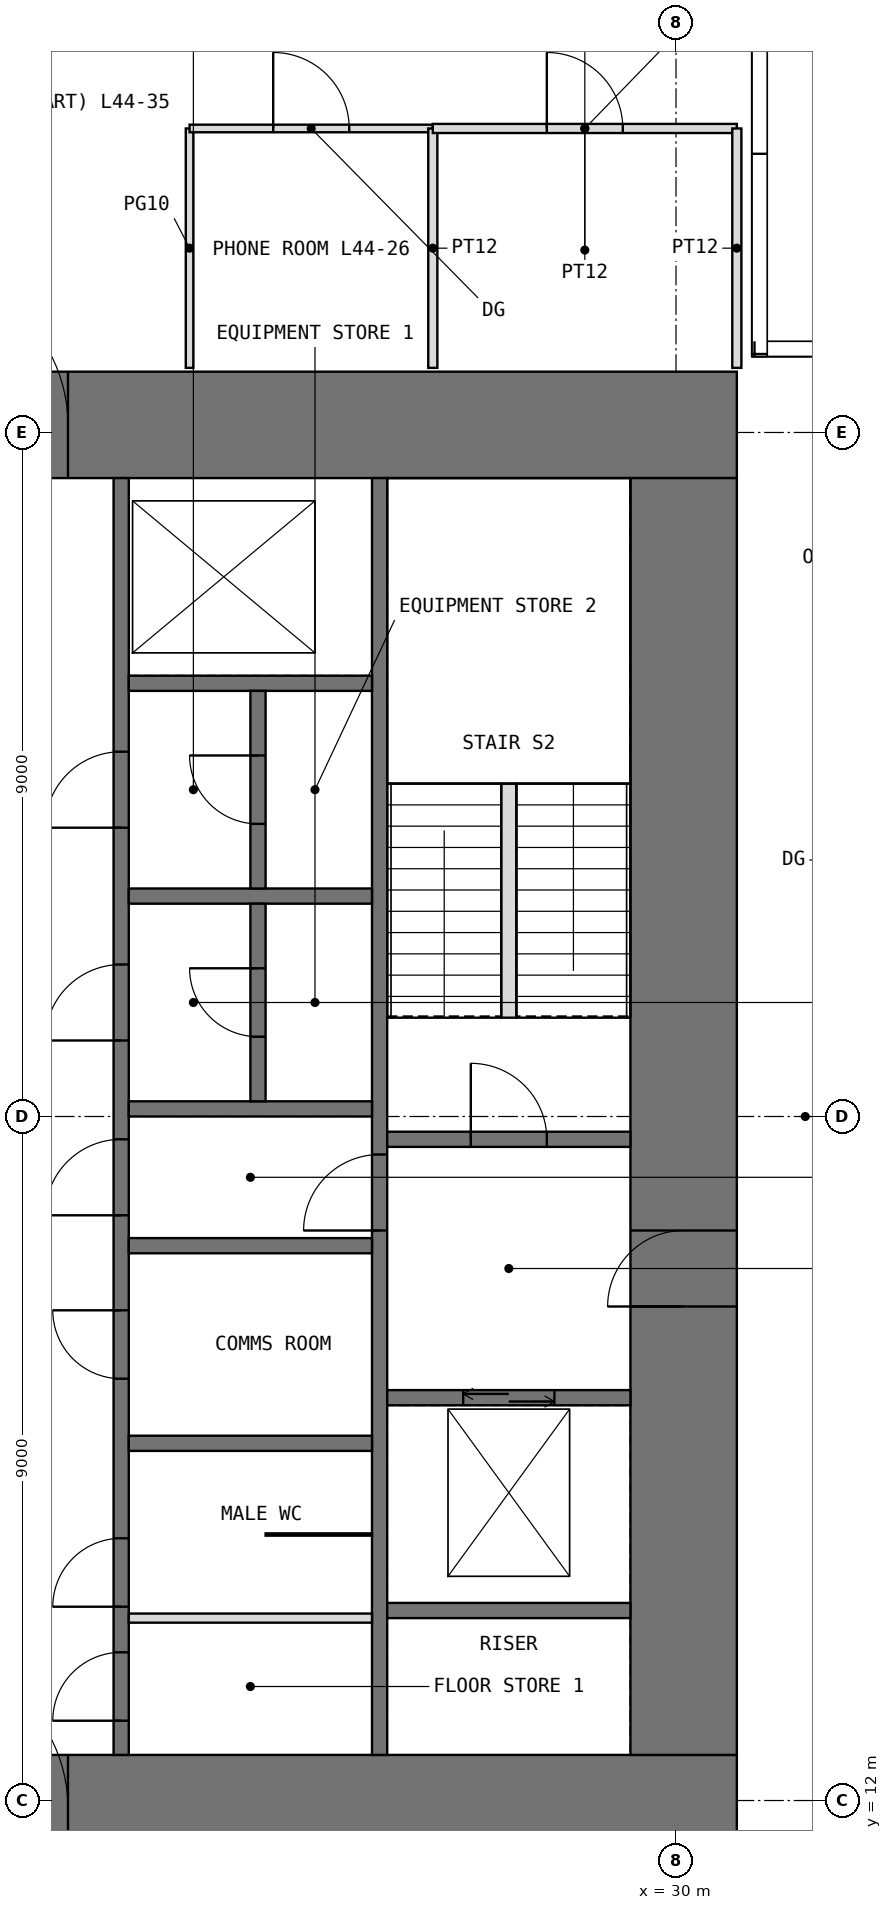
"""IFC4 building model, lengths in metres.
Left out: names, types, materials, properties, quantities, classifications, styles, units other than length and angle.
Written with IfcOpenShell. Run it as: python <this file> out.ifc"""

import sys

from ifc_helpers import new_model, si_unit, direction, frame, frame_2d, origin, place, context, subcontext, project, spatial, rectangle, extrude, element, fill, save


model = new_model("IFC4")
c1 = context("Model", 3, precision=1e-05, world=origin(), true_north=direction((0.0, 1.0)))
c2 = subcontext(c1, "Body", "Model", "MODEL_VIEW")
j1 = project(units=[si_unit("LENGTHUNIT", "METRE"), si_unit("PLANEANGLEUNIT", "RADIAN")], contexts=[c1])
p1 = place(None, origin())
s1 = spatial("IfcSite", under=j1, at=p1, CompositionType="ELEMENT")
p2 = place(p1, origin())
s2 = spatial("IfcBuilding", under=s1, at=p2, CompositionType="ELEMENT")
p3 = place(p2, frame((0.0, 0.0, 186.5)))
s3 = spatial("IfcBuildingStorey", under=s2, at=p3, CompositionType="ELEMENT", Elevation=186.5)
p4 = place(p3, frame((11.2, 11.9, -0.05), z_axis=(0.0, 0.0, 1.0), x_axis=(1.0, 0.0, 0.0)))
e1 = element("IfcWall", 1, at=p4, inside=s3, PredefinedType="SHEAR", context=c2, shape_type="SweptSolid", body=[
    extrude(rectangle(XDim=19.6, YDim=1.4, at=frame_2d((9.8, 0.0))), origin(), (0.0, 0.0, 1.0), 4.0),
])
p5 = place(p4, frame((8.8, 0.0, 0.05)))
e2 = element("IfcOpeningElement", 2, at=p5, cuts=e1, PredefinedType="OPENING", context=c2, shape_type="SweptSolid", body=[
    extrude(rectangle(XDim=2.0, YDim=2.2, at=frame_2d((1.0, 1.1))), frame((0.0, 0.71, 0.0), z_axis=(0.0, -1.0, 0.0), x_axis=(1.0, 0.0, 0.0)), (0.0, 0.0, 1.0), 1.42),
])
p6 = place(p3, frame((11.2, 30.1, -0.05), z_axis=(0.0, 0.0, 1.0), x_axis=(1.0, 0.0, 0.0)))
e3 = element("IfcWall", 3, at=p6, inside=s3, PredefinedType="SHEAR", context=c2, shape_type="SweptSolid", body=[
    extrude(rectangle(XDim=19.6, YDim=1.4, at=frame_2d((9.8, 0.0))), origin(), (0.0, 0.0, 1.0), 4.0),
])
p7 = place(p6, frame((8.8, 0.0, 0.05)))
e4 = element("IfcOpeningElement", 4, at=p7, cuts=e3, PredefinedType="OPENING", context=c2, shape_type="SweptSolid", body=[
    extrude(rectangle(XDim=2.0, YDim=2.2, at=frame_2d((1.0, 1.1))), frame((0.0, 0.71, 0.0), z_axis=(0.0, -1.0, 0.0), x_axis=(1.0, 0.0, 0.0)), (0.0, 0.0, 1.0), 1.42),
])
p8 = place(p3, frame((30.1, 12.6, -0.05), z_axis=(0.0, 0.0, 1.0), x_axis=(0.0, 1.0, 0.0)))
e5 = element("IfcWall", 5, at=p8, inside=s3, PredefinedType="SHEAR", context=c2, shape_type="SweptSolid", body=[
    extrude(rectangle(XDim=16.8, YDim=1.4, at=frame_2d((8.4, 0.0))), origin(), (0.0, 0.0, 1.0), 4.0),
])
p9 = place(p8, frame((5.9, 0.0, 0.05)))
e6 = element("IfcOpeningElement", 6, at=p9, cuts=e5, PredefinedType="OPENING", context=c2, shape_type="SweptSolid", body=[
    extrude(rectangle(XDim=1.0, YDim=2.2, at=frame_2d((0.5, 1.1))), frame((0.0, 0.71, 0.0), z_axis=(0.0, -1.0, 0.0), x_axis=(1.0, 0.0, 0.0)), (0.0, 0.0, 1.0), 1.42),
])
p10 = place(p3, frame((22.7, 12.6, -0.05), z_axis=(0.0, 0.0, 1.0), x_axis=(0.0, 1.0, 0.0)))
e7 = element("IfcWall", 7, at=p10, inside=s3, PredefinedType="SHEAR", context=c2, shape_type="SweptSolid", body=[
    extrude(rectangle(XDim=16.8, YDim=0.2, at=frame_2d((8.4, 0.0))), origin(), (0.0, 0.0, 1.0), 4.0),
])
p11 = place(p10, frame((0.45, 0.0, 0.05)))
e8 = element("IfcOpeningElement", 8, at=p11, cuts=e7, PredefinedType="OPENING", context=c2, shape_type="SweptSolid", body=[
    extrude(rectangle(XDim=0.9, YDim=2.2, at=frame_2d((0.45, 1.1))), frame((0.0, 0.11, 0.0), z_axis=(0.0, -1.0, 0.0), x_axis=(1.0, 0.0, 0.0)), (0.0, 0.0, 1.0), 0.22),
])
p12 = place(p10, frame((7.1, 0.0, 0.05)))
e9 = element("IfcOpeningElement", 9, at=p12, cuts=e7, PredefinedType="OPENING", context=c2, shape_type="SweptSolid", body=[
    extrude(rectangle(XDim=1.0, YDim=2.2, at=frame_2d((0.5, 1.1))), frame((0.0, 0.11, 0.0), z_axis=(0.0, -1.0, 0.0), x_axis=(1.0, 0.0, 0.0)), (0.0, 0.0, 1.0), 0.22),
])
p13 = place(p10, frame((1.95, 0.0, 0.05)))
e10 = element("IfcOpeningElement", 10, at=p13, cuts=e7, PredefinedType="OPENING", context=c2, shape_type="SweptSolid", body=[
    extrude(rectangle(XDim=0.9, YDim=2.2, at=frame_2d((0.45, 1.1))), frame((0.0, 0.11, 0.0), z_axis=(0.0, -1.0, 0.0), x_axis=(1.0, 0.0, 0.0)), (0.0, 0.0, 1.0), 0.22),
])
p14 = place(p10, frame((4.95, 0.0, 0.05)))
e11 = element("IfcOpeningElement", 11, at=p14, cuts=e7, PredefinedType="OPENING", context=c2, shape_type="SweptSolid", body=[
    extrude(rectangle(XDim=0.9, YDim=2.2, at=frame_2d((0.45, 1.1))), frame((0.0, 0.11, 0.0), z_axis=(0.0, -1.0, 0.0), x_axis=(1.0, 0.0, 0.0)), (0.0, 0.0, 1.0), 0.22),
])
p15 = place(p10, frame((9.4, 0.0, 0.05)))
e12 = element("IfcOpeningElement", 12, at=p15, cuts=e7, PredefinedType="OPENING", context=c2, shape_type="SweptSolid", body=[
    extrude(rectangle(XDim=1.0, YDim=2.2, at=frame_2d((0.5, 1.1))), frame((0.0, 0.11, 0.0), z_axis=(0.0, -1.0, 0.0), x_axis=(1.0, 0.0, 0.0)), (0.0, 0.0, 1.0), 0.22),
])
p16 = place(p10, frame((12.2, 0.0, 0.05)))
e13 = element("IfcOpeningElement", 13, at=p16, cuts=e7, PredefinedType="OPENING", context=c2, shape_type="SweptSolid", body=[
    extrude(rectangle(XDim=1.0, YDim=2.2, at=frame_2d((0.5, 1.1))), frame((0.0, 0.11, 0.0), z_axis=(0.0, -1.0, 0.0), x_axis=(1.0, 0.0, 0.0)), (0.0, 0.0, 1.0), 0.22),
])
p17 = place(p3, frame((26.1, 12.6, -0.05), z_axis=(0.0, 0.0, 1.0), x_axis=(0.0, 1.0, 0.0)))
e14 = element("IfcWall", 14, at=p17, inside=s3, PredefinedType="SHEAR", context=c2, shape_type="SweptSolid", body=[
    extrude(rectangle(XDim=16.8, YDim=0.2, at=frame_2d((8.4, 0.0))), origin(), (0.0, 0.0, 1.0), 4.0),
])
p18 = place(p17, frame((6.9, 0.0, 0.05)))
e15 = element("IfcOpeningElement", 15, at=p18, cuts=e14, PredefinedType="OPENING", context=c2, shape_type="SweptSolid", body=[
    extrude(rectangle(XDim=1.0, YDim=2.2, at=frame_2d((0.5, 1.1))), frame((0.0, 0.11, 0.0), z_axis=(0.0, -1.0, 0.0), x_axis=(1.0, 0.0, 0.0)), (0.0, 0.0, 1.0), 0.22),
])
for number, where, z_axis, x_axis in (
    (16, (22.8, 16.7, -0.05), (0.0, 0.0, 1.0), (1.0, 0.0, 0.0)),
    (17, (22.8, 19.3, -0.05), (0.0, 0.0, 1.0), (1.0, 0.0, 0.0)),
    (18, (22.8, 21.1, -0.05), (0.0, 0.0, 1.0), (1.0, 0.0, 0.0)),
    (19, (22.8, 23.9, -0.05), (0.0, 0.0, 1.0), (1.0, 0.0, 0.0)),
    (20, (22.8, 26.7, -0.05), (0.0, 0.0, 1.0), (1.0, 0.0, 0.0)),
    (21, (26.2, 14.5, -0.05), (0.0, 0.0, 1.0), (1.0, 0.0, 0.0)),
):
    element("IfcWall", number, at=place(p3, frame(where, z_axis=z_axis, x_axis=x_axis)), inside=s3, PredefinedType="SHEAR", context=c2, shape_type="SweptSolid", body=[
        extrude(rectangle(XDim=3.2, YDim=0.2, at=frame_2d((1.6, 0.0))), origin(), (0.0, 0.0, 1.0), 4.0),
    ])
p19 = place(p3, frame((26.2, 17.3, -0.05), z_axis=(0.0, 0.0, 1.0), x_axis=(1.0, 0.0, 0.0)))
e22 = element("IfcWall", 22, at=p19, inside=s3, PredefinedType="SHEAR", context=c2, shape_type="SweptSolid", body=[
    extrude(rectangle(XDim=3.2, YDim=0.2, at=frame_2d((1.6, 0.0))), origin(), (0.0, 0.0, 1.0), 4.0),
])
p20 = place(p19, frame((1.0, 0.0, 0.05)))
e23 = element("IfcOpeningElement", 23, at=p20, cuts=e22, PredefinedType="OPENING", context=c2, shape_type="SweptSolid", body=[
    extrude(rectangle(XDim=1.2, YDim=2.2, at=frame_2d((0.6, 1.1))), frame((0.0, 0.11, 0.0), z_axis=(0.0, -1.0, 0.0), x_axis=(1.0, 0.0, 0.0)), (0.0, 0.0, 1.0), 0.22),
])
p21 = place(p3, frame((26.2, 20.7, -0.05), z_axis=(0.0, 0.0, 1.0), x_axis=(1.0, 0.0, 0.0)))
e24 = element("IfcWall", 24, at=p21, inside=s3, PredefinedType="SHEAR", context=c2, shape_type="SweptSolid", body=[
    extrude(rectangle(XDim=3.2, YDim=0.2, at=frame_2d((1.6, 0.0))), origin(), (0.0, 0.0, 1.0), 4.0),
])
p22 = place(p21, frame((1.1, 0.0, 0.05)))
e25 = element("IfcOpeningElement", 25, at=p22, cuts=e24, PredefinedType="OPENING", context=c2, shape_type="SweptSolid", body=[
    extrude(rectangle(XDim=1.0, YDim=2.2, at=frame_2d((0.5, 1.1))), frame((0.0, 0.11, 0.0), z_axis=(0.0, -1.0, 0.0), x_axis=(1.0, 0.0, 0.0)), (0.0, 0.0, 1.0), 0.22),
])
p23 = place(p3, frame((22.8, 14.4, 0.0), z_axis=(0.0, 0.0, 1.0), x_axis=(1.0, 0.0, 0.0)))
e26 = element("IfcWall", 26, at=p23, inside=s3, PredefinedType="PARTITIONING", context=c2, shape_type="SweptSolid", body=[
    extrude(rectangle(XDim=3.2, YDim=0.12, at=frame_2d((1.6, 0.0))), origin(), (0.0, 0.0, 1.0), 3.75),
])
p24 = place(p3, frame((24.6, 15.5, 0.0), z_axis=(0.0, 0.0, 1.0), x_axis=(1.0, 0.0, 0.0)))
e27 = element("IfcWall", 27, at=p24, inside=s3, PredefinedType="PARTITIONING", context=c2, shape_type="SweptSolid", body=[
    extrude(rectangle(XDim=1.4, YDim=0.03, at=frame_2d((0.7, 0.0))), origin(), (0.0, 0.0, 1.0), 3.75),
])
p25 = place(p3, frame((24.5, 21.2, -0.05), z_axis=(0.0, 0.0, 1.0), x_axis=(0.0, 1.0, 0.0)))
e28 = element("IfcWall", 28, at=p25, inside=s3, PredefinedType="SHEAR", context=c2, shape_type="SweptSolid", body=[
    extrude(rectangle(XDim=2.6, YDim=0.2, at=frame_2d((1.3, 0.0))), origin(), (0.0, 0.0, 1.0), 4.0),
])
p26 = place(p25, frame((0.85, 0.0, 0.05)))
e29 = element("IfcOpeningElement", 29, at=p26, cuts=e28, PredefinedType="OPENING", context=c2, shape_type="SweptSolid", body=[
    extrude(rectangle(XDim=0.9, YDim=2.2, at=frame_2d((0.45, 1.1))), frame((0.0, 0.11, 0.0), z_axis=(0.0, -1.0, 0.0), x_axis=(1.0, 0.0, 0.0)), (0.0, 0.0, 1.0), 0.22),
])
p27 = place(p3, frame((24.5, 24.0, -0.05), z_axis=(0.0, 0.0, 1.0), x_axis=(0.0, 1.0, 0.0)))
e30 = element("IfcWall", 30, at=p27, inside=s3, PredefinedType="SHEAR", context=c2, shape_type="SweptSolid", body=[
    extrude(rectangle(XDim=2.6, YDim=0.2, at=frame_2d((1.3, 0.0))), origin(), (0.0, 0.0, 1.0), 4.0),
])
p28 = place(p27, frame((0.85, 0.0, 0.05)))
e31 = element("IfcOpeningElement", 31, at=p28, cuts=e30, PredefinedType="OPENING", context=c2, shape_type="SweptSolid", body=[
    extrude(rectangle(XDim=0.9, YDim=2.2, at=frame_2d((0.45, 1.1))), frame((0.0, 0.11, 0.0), z_axis=(0.0, -1.0, 0.0), x_axis=(1.0, 0.0, 0.0)), (0.0, 0.0, 1.0), 0.22),
])
p29 = place(p3, frame((23.6, 30.85, 0.0), z_axis=(0.0, 0.0, 1.0), x_axis=(0.0, 1.0, 0.0)))
e32 = element("IfcWall", 32, at=p29, inside=s3, PredefinedType="PARTITIONING", context=c2, shape_type="SweptSolid", body=[
    extrude(rectangle(XDim=3.15, YDim=0.1, at=frame_2d((1.575, 0.0))), origin(), (0.0, 0.0, 1.0), 3.75),
])
p30 = place(p3, frame((23.6, 34.0, 0.0), z_axis=(0.0, 0.0, 1.0), x_axis=(1.0, 0.0, 0.0)))
e33 = element("IfcWall", 33, at=p30, inside=s3, PredefinedType="PARTITIONING", context=c2, shape_type="SweptSolid", body=[
    extrude(rectangle(XDim=3.2, YDim=0.1, at=frame_2d((1.6, 0.0))), origin(), (0.0, 0.0, 1.0), 3.75),
])
p31 = place(p30, frame((1.1, 0.0, 0.0)))
e34 = element("IfcOpeningElement", 34, at=p31, cuts=e33, PredefinedType="OPENING", context=c2, shape_type="SweptSolid", body=[
    extrude(rectangle(XDim=1.0, YDim=2.4, at=frame_2d((0.5, 1.2))), frame((0.0, 0.06, 0.0), z_axis=(0.0, -1.0, 0.0), x_axis=(1.0, 0.0, 0.0)), (0.0, 0.0, 1.0), 0.12),
])
p32 = place(p3, frame((26.8, 30.85, 0.0), z_axis=(0.0, 0.0, 1.0), x_axis=(0.0, 1.0, 0.0)))
e35 = element("IfcWall", 35, at=p32, inside=s3, PredefinedType="PARTITIONING", context=c2, shape_type="SweptSolid", body=[
    extrude(rectangle(XDim=3.15, YDim=0.12, at=frame_2d((1.575, 0.0))), origin(), (0.0, 0.0, 1.0), 3.75),
])
p33 = place(p3, frame((26.8, 34.0, 0.0), z_axis=(0.0, 0.0, 1.0), x_axis=(1.0, 0.0, 0.0)))
e36 = element("IfcWall", 36, at=p33, inside=s3, PredefinedType="PARTITIONING", context=c2, shape_type="SweptSolid", body=[
    extrude(rectangle(XDim=4.0, YDim=0.12, at=frame_2d((2.0, 0.0))), origin(), (0.0, 0.0, 1.0), 3.75),
])
p34 = place(p33, frame((1.5, 0.0, 0.0)))
e37 = element("IfcOpeningElement", 37, at=p34, cuts=e36, PredefinedType="OPENING", context=c2, shape_type="SweptSolid", body=[
    extrude(rectangle(XDim=1.0, YDim=2.2, at=frame_2d((0.5, 1.1))), frame((0.0, 0.07, 0.0), z_axis=(0.0, -1.0, 0.0), x_axis=(1.0, 0.0, 0.0)), (0.0, 0.0, 1.0), 0.14),
])
p35 = place(p3, frame((30.8, 30.85, 0.0), z_axis=(0.0, 0.0, 1.0), x_axis=(0.0, 1.0, 0.0)))
e38 = element("IfcWall", 38, at=p35, inside=s3, PredefinedType="PARTITIONING", context=c2, shape_type="SweptSolid", body=[
    extrude(rectangle(XDim=3.15, YDim=0.12, at=frame_2d((1.575, 0.0))), origin(), (0.0, 0.0, 1.0), 3.75),
])
p36 = place(p3, frame((27.8, 22.3, 0.0), z_axis=(0.0, 0.0, 1.0), x_axis=(0.0, 1.0, 0.0)))
e39 = element("IfcWall", 39, at=p36, inside=s3, PredefinedType="PARTITIONING", context=c2, shape_type="SweptSolid", body=[
    extrude(rectangle(XDim=3.08, YDim=0.2, at=frame_2d((1.54, 0.0))), origin(), (0.0, 0.0, 1.0), 4.0),
])
p37 = place(p5, origin())
e40 = element("IfcDoor", 40, at=p37, inside=s3, OperationType="DOUBLE_DOOR_SINGLE_SWING", PredefinedType="DOOR", context=c2, shape_type="SweptSolid", body=[
    extrude(rectangle(XDim=2.0, YDim=2.2, at=frame_2d((1.0, 1.1))), frame((0.0, 0.025, 0.0), z_axis=(0.0, -1.0, 0.0), x_axis=(1.0, 0.0, 0.0)), (0.0, 0.0, 1.0), 0.05),
])
fill(e2, e40)
p38 = place(p7, origin())
e41 = element("IfcDoor", 41, at=p38, inside=s3, OperationType="DOUBLE_DOOR_SINGLE_SWING", PredefinedType="DOOR", context=c2, shape_type="SweptSolid", body=[
    extrude(rectangle(XDim=2.0, YDim=2.2, at=frame_2d((1.0, 1.1))), frame((0.0, 0.025, 0.0), z_axis=(0.0, -1.0, 0.0), x_axis=(1.0, 0.0, 0.0)), (0.0, 0.0, 1.0), 0.05),
])
fill(e4, e41)
p39 = place(p11, origin())
e42 = element("IfcDoor", 42, at=p39, inside=s3, OperationType="SINGLE_SWING_LEFT", PredefinedType="DOOR", context=c2, shape_type="SweptSolid", body=[
    extrude(rectangle(XDim=0.9, YDim=2.2, at=frame_2d((0.45, 1.1))), frame((0.0, 0.025, 0.0), z_axis=(0.0, -1.0, 0.0), x_axis=(1.0, 0.0, 0.0)), (0.0, 0.0, 1.0), 0.05),
])
fill(e8, e42)
p40 = place(p9, origin())
e43 = element("IfcDoor", 43, at=p40, inside=s3, OperationType="SINGLE_SWING_LEFT", PredefinedType="DOOR", context=c2, shape_type="SweptSolid", body=[
    extrude(rectangle(XDim=1.0, YDim=2.2, at=frame_2d((0.5, 1.1))), frame((0.0, 0.025, 0.0), z_axis=(0.0, -1.0, 0.0), x_axis=(1.0, 0.0, 0.0)), (0.0, 0.0, 1.0), 0.05),
])
fill(e6, e43)
p41 = place(p22, origin())
e44 = element("IfcDoor", 44, at=p41, inside=s3, OperationType="SINGLE_SWING_LEFT", PredefinedType="DOOR", context=c2, shape_type="SweptSolid", body=[
    extrude(rectangle(XDim=1.0, YDim=2.2, at=frame_2d((0.5, 1.1))), frame((0.0, 0.025, 0.0), z_axis=(0.0, -1.0, 0.0), x_axis=(1.0, 0.0, 0.0)), (0.0, 0.0, 1.0), 0.05),
])
fill(e25, e44)
p42 = place(p18, origin())
e45 = element("IfcDoor", 45, at=p42, inside=s3, OperationType="SINGLE_SWING_LEFT", PredefinedType="DOOR", context=c2, shape_type="SweptSolid", body=[
    extrude(rectangle(XDim=1.0, YDim=2.2, at=frame_2d((0.5, 1.1))), frame((0.0, 0.025, 0.0), z_axis=(0.0, -1.0, 0.0), x_axis=(1.0, 0.0, 0.0)), (0.0, 0.0, 1.0), 0.05),
])
fill(e15, e45)
p43 = place(p12, origin())
e46 = element("IfcDoor", 46, at=p43, inside=s3, OperationType="SINGLE_SWING_LEFT", PredefinedType="DOOR", context=c2, shape_type="SweptSolid", body=[
    extrude(rectangle(XDim=1.0, YDim=2.2, at=frame_2d((0.5, 1.1))), frame((0.0, 0.025, 0.0), z_axis=(0.0, -1.0, 0.0), x_axis=(1.0, 0.0, 0.0)), (0.0, 0.0, 1.0), 0.05),
])
fill(e9, e46)
p44 = place(p13, origin())
e47 = element("IfcDoor", 47, at=p44, inside=s3, OperationType="SINGLE_SWING_LEFT", PredefinedType="DOOR", context=c2, shape_type="SweptSolid", body=[
    extrude(rectangle(XDim=0.9, YDim=2.2, at=frame_2d((0.45, 1.1))), frame((0.0, 0.025, 0.0), z_axis=(0.0, -1.0, 0.0), x_axis=(1.0, 0.0, 0.0)), (0.0, 0.0, 1.0), 0.05),
])
fill(e10, e47)
p45 = place(p14, origin())
e48 = element("IfcDoor", 48, at=p45, inside=s3, OperationType="SINGLE_SWING_RIGHT", PredefinedType="DOOR", context=c2, shape_type="SweptSolid", body=[
    extrude(rectangle(XDim=0.9, YDim=2.2, at=frame_2d((0.45, 1.1))), frame((0.0, 0.025, 0.0), z_axis=(0.0, -1.0, 0.0), x_axis=(1.0, 0.0, 0.0)), (0.0, 0.0, 1.0), 0.05),
])
fill(e11, e48)
p46 = place(p15, origin())
e49 = element("IfcDoor", 49, at=p46, inside=s3, OperationType="SINGLE_SWING_LEFT", PredefinedType="DOOR", context=c2, shape_type="SweptSolid", body=[
    extrude(rectangle(XDim=1.0, YDim=2.2, at=frame_2d((0.5, 1.1))), frame((0.0, 0.025, 0.0), z_axis=(0.0, -1.0, 0.0), x_axis=(1.0, 0.0, 0.0)), (0.0, 0.0, 1.0), 0.05),
])
fill(e12, e49)
p47 = place(p26, origin())
e50 = element("IfcDoor", 50, at=p47, inside=s3, OperationType="SINGLE_SWING_RIGHT", PredefinedType="DOOR", context=c2, shape_type="SweptSolid", body=[
    extrude(rectangle(XDim=0.9, YDim=2.2, at=frame_2d((0.45, 1.1))), frame((0.0, 0.025, 0.0), z_axis=(0.0, -1.0, 0.0), x_axis=(1.0, 0.0, 0.0)), (0.0, 0.0, 1.0), 0.05),
])
fill(e29, e50)
p48 = place(p16, origin())
e51 = element("IfcDoor", 51, at=p48, inside=s3, OperationType="SINGLE_SWING_LEFT", PredefinedType="DOOR", context=c2, shape_type="SweptSolid", body=[
    extrude(rectangle(XDim=1.0, YDim=2.2, at=frame_2d((0.5, 1.1))), frame((0.0, 0.025, 0.0), z_axis=(0.0, -1.0, 0.0), x_axis=(1.0, 0.0, 0.0)), (0.0, 0.0, 1.0), 0.05),
])
fill(e13, e51)
p49 = place(p28, origin())
e52 = element("IfcDoor", 52, at=p49, inside=s3, OperationType="SINGLE_SWING_RIGHT", PredefinedType="DOOR", context=c2, shape_type="SweptSolid", body=[
    extrude(rectangle(XDim=0.9, YDim=2.2, at=frame_2d((0.45, 1.1))), frame((0.0, 0.025, 0.0), z_axis=(0.0, -1.0, 0.0), x_axis=(1.0, 0.0, 0.0)), (0.0, 0.0, 1.0), 0.05),
])
fill(e31, e52)
p50 = place(p31, origin())
e53 = element("IfcDoor", 53, at=p50, inside=s3, OperationType="SINGLE_SWING_LEFT", PredefinedType="DOOR", context=c2, shape_type="SweptSolid", body=[
    extrude(rectangle(XDim=1.0, YDim=2.4, at=frame_2d((0.5, 1.2))), frame((0.0, 0.025, 0.0), z_axis=(0.0, -1.0, 0.0), x_axis=(1.0, 0.0, 0.0)), (0.0, 0.0, 1.0), 0.05),
])
fill(e34, e53)
p51 = place(p34, origin())
e54 = element("IfcDoor", 54, at=p51, inside=s3, OperationType="SINGLE_SWING_LEFT", PredefinedType="DOOR", context=c2, shape_type="SweptSolid", body=[
    extrude(rectangle(XDim=1.0, YDim=2.2, at=frame_2d((0.5, 1.1))), frame((0.0, 0.025, 0.0), z_axis=(0.0, -1.0, 0.0), x_axis=(1.0, 0.0, 0.0)), (0.0, 0.0, 1.0), 0.05),
])
fill(e37, e54)
p52 = place(p20, origin())
e55 = element("IfcDoor", 55, at=p52, inside=s3, OperationType="DOUBLE_DOOR_SLIDING", PredefinedType="DOOR", context=c2, shape_type="SweptSolid", body=[
    extrude(rectangle(XDim=1.2, YDim=2.2, at=frame_2d((0.6, 1.1))), frame((0.0, 0.025, 0.0), z_axis=(0.0, -1.0, 0.0), x_axis=(1.0, 0.0, 0.0)), (0.0, 0.0, 1.0), 0.05),
])
fill(e23, e55)
save(model, sys.argv[1])
